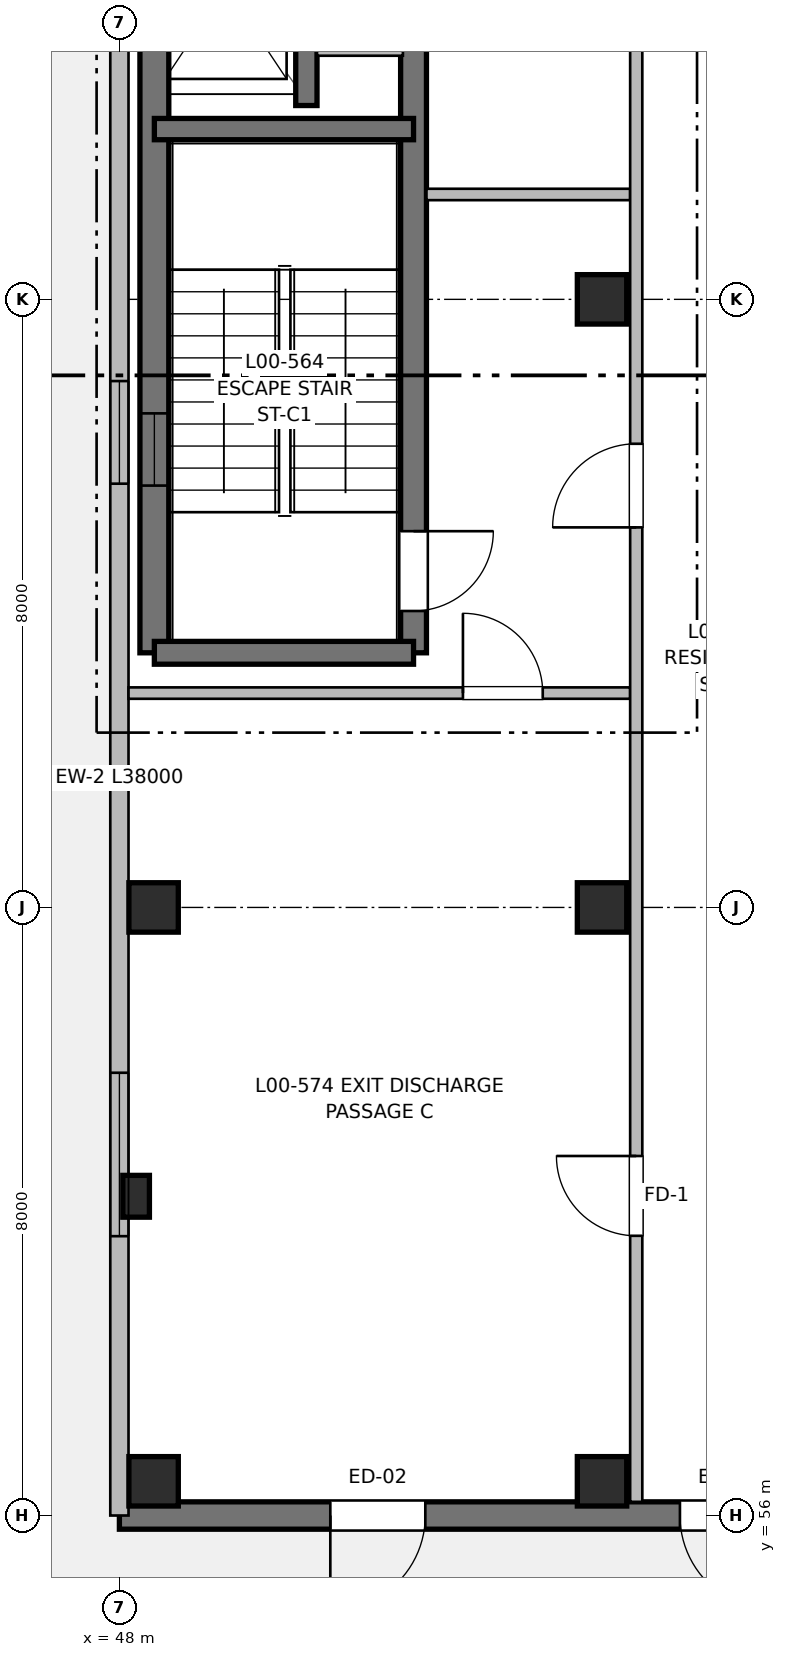
"""IFC4 building model, lengths in metres.
Left out: names, types, materials, properties, quantities, classifications, styles, units other than length and angle.
Written with IfcOpenShell. Run it as: python <this file> out.ifc"""

import sys

from ifc_helpers import new_model, si_unit, direction, frame, frame_2d, origin, origin_2d, place, context, subcontext, project, spatial, rectangle, extrude, element, fill, save


model = new_model("IFC4")
c1 = context("Model", 3, precision=1e-05, world=origin(), true_north=direction((0.0, 1.0)))
c2 = subcontext(c1, "Body", "Model", "MODEL_VIEW")
j1 = project(units=[si_unit("LENGTHUNIT", "METRE"), si_unit("PLANEANGLEUNIT", "RADIAN")], contexts=[c1])
p1 = place(None, origin())
s1 = spatial("IfcSite", under=j1, at=p1, CompositionType="ELEMENT")
p2 = place(p1, origin())
s2 = spatial("IfcBuilding", under=s1, at=p2, CompositionType="ELEMENT")
p3 = place(p2, origin())
s3 = spatial("IfcBuildingStorey", under=s2, at=p3, CompositionType="ELEMENT", Elevation=0.0)
p4 = place(p3, frame((48.22, 60.2, 0.0), z_axis=(0.0, 0.0, 1.0), x_axis=(1.0, 0.0, 0.0)))
e1 = element("IfcColumn", 1, at=p4, inside=s3, PredefinedType="PILASTER", context=c2, shape_type="SweptSolid", body=[
    extrude(rectangle(XDim=0.35, YDim=0.55, at=origin_2d()), origin(), (0.0, 0.0, 1.0), 4.16),
])
for number, where, z_axis, x_axis in (
    (2, (48.45, 56.45, 0.0), (0.0, 0.0, 1.0), (1.0, 0.0, 0.0)),
    (3, (48.45, 64.0, 0.0), (0.0, 0.0, 1.0), (1.0, 0.0, 0.0)),
    (4, (54.35, 56.45, 0.0), (0.0, 0.0, 1.0), (1.0, 0.0, 0.0)),
    (5, (54.35, 64.0, 0.0), (0.0, 0.0, 1.0), (1.0, 0.0, 0.0)),
    (6, (54.35, 72.0, 0.0), (0.0, 0.0, 1.0), (1.0, 0.0, 0.0)),
):
    element("IfcColumn", number, at=place(p3, frame(where, z_axis=z_axis, x_axis=x_axis)), inside=s3, PredefinedType="COLUMN", context=c2, shape_type="SweptSolid", body=[
        extrude(rectangle(XDim=0.65, YDim=0.65, at=origin_2d()), origin(), (0.0, 0.0, 1.0), 4.16),
    ])
p5 = place(p3, frame((48.46, 67.35, 0.0), z_axis=(0.0, 0.0, 1.0), x_axis=(0.0, 1.0, 0.0)))
e7 = element("IfcWall", 7, at=p5, inside=s3, PredefinedType="SHEAR", context=c2, shape_type="SweptSolid", body=[
    extrude(rectangle(XDim=12.45, YDim=0.38, at=frame_2d((6.225, 0.0))), origin(), (0.0, 0.0, 1.0), 4.16),
])
p6 = place(p5, frame((2.2, 0.0, 1.2)))
e8 = element("IfcOpeningElement", 8, at=p6, cuts=e7, PredefinedType="OPENING", context=c2, shape_type="SweptSolid", body=[
    extrude(rectangle(XDim=0.95, YDim=1.25, at=frame_2d((0.475, 0.625))), frame((0.0, 0.2, 0.0), z_axis=(0.0, -1.0, 0.0), x_axis=(1.0, 0.0, 0.0)), (0.0, 0.0, 1.0), 0.4),
])
p7 = place(p3, frame((51.87, 79.8, 0.0), z_axis=(0.0, 0.0, 1.0), x_axis=(0.0, -1.0, 0.0)))
e9 = element("IfcWall", 9, at=p7, inside=s3, PredefinedType="SHEAR", context=c2, shape_type="SweptSolid", body=[
    extrude(rectangle(XDim=12.45, YDim=0.34, at=frame_2d((6.225, 0.0))), origin(), (0.0, 0.0, 1.0), 4.16),
])
p8 = place(p7, frame((10.85, 0.0, 0.0)))
e10 = element("IfcOpeningElement", 10, at=p8, cuts=e9, PredefinedType="OPENING", context=c2, shape_type="SweptSolid", body=[
    extrude(rectangle(XDim=1.05, YDim=2.15, at=frame_2d((0.525, 1.075))), frame((0.0, 0.18, 0.0), z_axis=(0.0, -1.0, 0.0), x_axis=(1.0, 0.0, 0.0)), (0.0, 0.0, 1.0), 0.36),
])
p9 = place(p3, frame((51.87, 67.35, 0.0), z_axis=(0.0, 0.0, 1.0), x_axis=(-1.0, 0.0, 0.0)))
e11 = element("IfcWall", 11, at=p9, inside=s3, PredefinedType="SHEAR", context=c2, shape_type="SweptSolid", body=[
    extrude(rectangle(XDim=3.41, YDim=0.3, at=frame_2d((1.705, 0.0))), origin(), (0.0, 0.0, 1.0), 4.16),
])
p10 = place(p3, frame((48.46, 74.24, 0.0), z_axis=(0.0, 0.0, 1.0), x_axis=(1.0, 0.0, 0.0)))
e12 = element("IfcWall", 12, at=p10, inside=s3, PredefinedType="SHEAR", context=c2, shape_type="SweptSolid", body=[
    extrude(rectangle(XDim=3.41, YDim=0.28, at=frame_2d((1.705, 0.0))), origin(), (0.0, 0.0, 1.0), 4.16),
])
p11 = place(p3, frame((50.46, 74.55, 0.0), z_axis=(0.0, 0.0, 1.0), x_axis=(0.0, 1.0, 0.0)))
e13 = element("IfcWall", 13, at=p11, inside=s3, PredefinedType="SHEAR", context=c2, shape_type="SweptSolid", body=[
    extrude(rectangle(XDim=5.25, YDim=0.28, at=frame_2d((2.625, 0.0))), origin(), (0.0, 0.0, 1.0), 4.16),
])
p12 = place(p11, frame((1.15, 0.0, 0.0)))
e14 = element("IfcOpeningElement", 14, at=p12, cuts=e13, PredefinedType="OPENING", context=c2, shape_type="SweptSolid", body=[
    extrude(rectangle(XDim=1.0, YDim=2.15, at=frame_2d((0.5, 1.075))), frame((0.0, 0.15, 0.0), z_axis=(0.0, -1.0, 0.0), x_axis=(1.0, 0.0, 0.0)), (0.0, 0.0, 1.0), 0.3),
])
p13 = place(p11, frame((3.85, 0.0, 0.0)))
e15 = element("IfcOpeningElement", 15, at=p13, cuts=e13, PredefinedType="OPENING", context=c2, shape_type="SweptSolid", body=[
    extrude(rectangle(XDim=0.9, YDim=2.15, at=frame_2d((0.45, 1.075))), frame((0.0, 0.15, 0.0), z_axis=(0.0, -1.0, 0.0), x_axis=(1.0, 0.0, 0.0)), (0.0, 0.0, 1.0), 0.3),
])
p14 = place(p3, frame((50.6, 75.28, 0.0), z_axis=(0.0, 0.0, 1.0), x_axis=(1.0, 0.0, 0.0)))
e16 = element("IfcWall", 16, at=p14, inside=s3, PredefinedType="PARTITIONING", context=c2, shape_type="SweptSolid", body=[
    extrude(rectangle(XDim=1.13, YDim=0.15, at=frame_2d((0.565, 0.0))), origin(), (0.0, 0.0, 1.0), 3.91),
])
p15 = place(p3, frame((64.0, 56.0, 0.0), z_axis=(0.0, 0.0, 1.0), x_axis=(-1.0, 0.0, 0.0)))
e17 = element("IfcWall", 17, at=p15, inside=s3, PredefinedType="SHEAR", context=c2, shape_type="SweptSolid", body=[
    extrude(rectangle(XDim=16.0, YDim=0.36, at=frame_2d((8.0, 0.0))), origin(), (0.0, 0.0, 1.0), 3.94),
])
p16 = place(p15, frame((7.375, 0.0, 0.0)))
e18 = element("IfcOpeningElement", 18, at=p16, cuts=e17, PredefinedType="OPENING", context=c2, shape_type="SweptSolid", body=[
    extrude(rectangle(XDim=1.25, YDim=2.2, at=frame_2d((0.625, 1.1))), frame((0.0, 0.19, 0.0), z_axis=(0.0, -1.0, 0.0), x_axis=(1.0, 0.0, 0.0)), (0.0, 0.0, 1.0), 0.38),
])
p17 = place(p15, frame((11.975, 0.0, 0.0)))
e19 = element("IfcOpeningElement", 19, at=p17, cuts=e17, PredefinedType="OPENING", context=c2, shape_type="SweptSolid", body=[
    extrude(rectangle(XDim=1.25, YDim=2.2, at=frame_2d((0.625, 1.1))), frame((0.0, 0.19, 0.0), z_axis=(0.0, -1.0, 0.0), x_axis=(1.0, 0.0, 0.0)), (0.0, 0.0, 1.0), 0.38),
])
p18 = place(p3, frame((48.0, 56.0, 0.0), z_axis=(0.0, 0.0, 1.0), x_axis=(0.0, 1.0, 0.0)))
e20 = element("IfcWall", 20, at=p18, inside=s3, PredefinedType="SOLIDWALL", context=c2, shape_type="SweptSolid", body=[
    extrude(rectangle(XDim=38.0, YDim=0.24, at=frame_2d((19.0, 0.0))), origin(), (0.0, 0.0, 1.0), 3.94),
])
p19 = place(p18, frame((3.675, 0.0, 0.95)))
e21 = element("IfcOpeningElement", 21, at=p19, cuts=e20, PredefinedType="OPENING", context=c2, shape_type="SweptSolid", body=[
    extrude(rectangle(XDim=2.15, YDim=1.8, at=frame_2d((1.075, 0.9))), frame((0.0, 0.13, 0.0), z_axis=(0.0, -1.0, 0.0), x_axis=(1.0, 0.0, 0.0)), (0.0, 0.0, 1.0), 0.26),
])
p20 = place(p18, frame((13.575, 0.0, 0.95)))
e22 = element("IfcOpeningElement", 22, at=p20, cuts=e20, PredefinedType="OPENING", context=c2, shape_type="SweptSolid", body=[
    extrude(rectangle(XDim=1.35, YDim=1.3, at=frame_2d((0.675, 0.65))), frame((0.0, 0.13, 0.0), z_axis=(0.0, -1.0, 0.0), x_axis=(1.0, 0.0, 0.0)), (0.0, 0.0, 1.0), 0.26),
])
p21 = place(p18, frame((23.975, 0.0, 0.95)))
e23 = element("IfcOpeningElement", 23, at=p21, cuts=e20, PredefinedType="OPENING", context=c2, shape_type="SweptSolid", body=[
    extrude(rectangle(XDim=2.15, YDim=1.8, at=frame_2d((1.075, 0.9))), frame((0.0, 0.13, 0.0), z_axis=(0.0, -1.0, 0.0), x_axis=(1.0, 0.0, 0.0)), (0.0, 0.0, 1.0), 0.26),
])
p22 = place(p18, frame((32.575, 0.0, 0.95)))
e24 = element("IfcOpeningElement", 24, at=p22, cuts=e20, PredefinedType="OPENING", context=c2, shape_type="SweptSolid", body=[
    extrude(rectangle(XDim=1.35, YDim=1.3, at=frame_2d((0.675, 0.65))), frame((0.0, 0.13, 0.0), z_axis=(0.0, -1.0, 0.0), x_axis=(1.0, 0.0, 0.0)), (0.0, 0.0, 1.0), 0.26),
])
p23 = place(p3, frame((48.12, 66.82, 0.0), z_axis=(0.0, 0.0, 1.0), x_axis=(1.0, 0.0, 0.0)))
e25 = element("IfcWall", 25, at=p23, inside=s3, PredefinedType="PARTITIONING", context=c2, shape_type="SweptSolid", body=[
    extrude(rectangle(XDim=6.6, YDim=0.15, at=frame_2d((3.3, 0.0))), origin(), (0.0, 0.0, 1.0), 3.895),
])
p24 = place(p23, frame((4.4, 0.0, 0.0)))
e26 = element("IfcOpeningElement", 26, at=p24, cuts=e25, PredefinedType="OPENING", context=c2, shape_type="SweptSolid", body=[
    extrude(rectangle(XDim=1.05, YDim=2.15, at=frame_2d((0.525, 1.075))), frame((0.0, 0.085, 0.0), z_axis=(0.0, -1.0, 0.0), x_axis=(1.0, 0.0, 0.0)), (0.0, 0.0, 1.0), 0.17),
])
p25 = place(p3, frame((52.04, 73.38, 0.0), z_axis=(0.0, 0.0, 1.0), x_axis=(1.0, 0.0, 0.0)))
e27 = element("IfcWall", 27, at=p25, inside=s3, PredefinedType="PARTITIONING", context=c2, shape_type="SweptSolid", body=[
    extrude(rectangle(XDim=2.68, YDim=0.15, at=frame_2d((1.34, 0.0))), origin(), (0.0, 0.0, 1.0), 3.895),
])
p26 = place(p3, frame((54.8, 56.18, 0.0), z_axis=(0.0, 0.0, 1.0), x_axis=(0.0, 1.0, 0.0)))
e28 = element("IfcWall", 28, at=p26, inside=s3, PredefinedType="PARTITIONING", context=c2, shape_type="SweptSolid", body=[
    extrude(rectangle(XDim=50.62, YDim=0.16, at=frame_2d((25.31, 0.0))), origin(), (0.0, 0.0, 1.0), 3.895),
])
p27 = place(p26, frame((12.82, 0.0, 0.0)))
e29 = element("IfcOpeningElement", 29, at=p27, cuts=e28, PredefinedType="OPENING", context=c2, shape_type="SweptSolid", body=[
    extrude(rectangle(XDim=1.1, YDim=2.15, at=frame_2d((0.55, 1.075))), frame((0.0, 0.09, 0.0), z_axis=(0.0, -1.0, 0.0), x_axis=(1.0, 0.0, 0.0)), (0.0, 0.0, 1.0), 0.18),
])
p28 = place(p26, frame((19.22, 0.0, 0.0)))
e30 = element("IfcOpeningElement", 30, at=p28, cuts=e28, PredefinedType="OPENING", context=c2, shape_type="SweptSolid", body=[
    extrude(rectangle(XDim=1.6, YDim=2.15, at=frame_2d((0.8, 1.075))), frame((0.0, 0.09, 0.0), z_axis=(0.0, -1.0, 0.0), x_axis=(1.0, 0.0, 0.0)), (0.0, 0.0, 1.0), 0.18),
])
p29 = place(p26, frame((3.5, 0.0, 0.0)))
e31 = element("IfcOpeningElement", 31, at=p29, cuts=e28, PredefinedType="OPENING", context=c2, shape_type="SweptSolid", body=[
    extrude(rectangle(XDim=1.05, YDim=2.15, at=frame_2d((0.525, 1.075))), frame((0.0, 0.09, 0.0), z_axis=(0.0, -1.0, 0.0), x_axis=(1.0, 0.0, 0.0)), (0.0, 0.0, 1.0), 0.18),
])
p30 = place(p26, frame((29.2, 0.0, 0.0)))
e32 = element("IfcOpeningElement", 32, at=p30, cuts=e28, PredefinedType="OPENING", context=c2, shape_type="SweptSolid", body=[
    extrude(rectangle(XDim=1.55, YDim=2.2, at=frame_2d((0.775, 1.1))), frame((0.0, 0.09, 0.0), z_axis=(0.0, -1.0, 0.0), x_axis=(1.0, 0.0, 0.0)), (0.0, 0.0, 1.0), 0.18),
])
p31 = place(p8, origin())
e33 = element("IfcDoor", 33, at=p31, inside=s3, OperationType="SINGLE_SWING_LEFT", PredefinedType="DOOR", context=c2, shape_type="SweptSolid", body=[
    extrude(rectangle(XDim=1.05, YDim=2.15, at=frame_2d((0.525, 1.075))), frame((0.0, 0.025, 0.0), z_axis=(0.0, -1.0, 0.0), x_axis=(1.0, 0.0, 0.0)), (0.0, 0.0, 1.0), 0.05),
])
fill(e10, e33)
p32 = place(p6, origin())
e34 = element("IfcWindow", 34, at=p32, inside=s3, PartitioningType="SINGLE_PANEL", PredefinedType="WINDOW", context=c2, shape_type="SweptSolid", body=[
    extrude(rectangle(XDim=0.95, YDim=1.25, at=frame_2d((0.475, 0.625))), frame((0.0, 0.03, 0.0), z_axis=(0.0, -1.0, 0.0), x_axis=(1.0, 0.0, 0.0)), (0.0, 0.0, 1.0), 0.06),
])
fill(e8, e34)
p33 = place(p16, origin())
e35 = element("IfcDoor", 35, at=p33, inside=s3, OperationType="SINGLE_SWING_LEFT", PredefinedType="DOOR", context=c2, shape_type="SweptSolid", body=[
    extrude(rectangle(XDim=1.25, YDim=2.2, at=frame_2d((0.625, 1.1))), frame((0.0, 0.025, 0.0), z_axis=(0.0, -1.0, 0.0), x_axis=(1.0, 0.0, 0.0)), (0.0, 0.0, 1.0), 0.05),
])
fill(e18, e35)
p34 = place(p17, origin())
e36 = element("IfcDoor", 36, at=p34, inside=s3, OperationType="SINGLE_SWING_RIGHT", PredefinedType="DOOR", context=c2, shape_type="SweptSolid", body=[
    extrude(rectangle(XDim=1.25, YDim=2.2, at=frame_2d((0.625, 1.1))), frame((0.0, 0.025, 0.0), z_axis=(0.0, -1.0, 0.0), x_axis=(1.0, 0.0, 0.0)), (0.0, 0.0, 1.0), 0.05),
])
fill(e19, e36)
p35 = place(p19, origin())
e37 = element("IfcWindow", 37, at=p35, inside=s3, PartitioningType="SINGLE_PANEL", PredefinedType="WINDOW", context=c2, shape_type="SweptSolid", body=[
    extrude(rectangle(XDim=2.15, YDim=1.8, at=frame_2d((1.075, 0.9))), frame((0.0, 0.03, 0.0), z_axis=(0.0, -1.0, 0.0), x_axis=(1.0, 0.0, 0.0)), (0.0, 0.0, 1.0), 0.06),
])
fill(e21, e37)
p36 = place(p20, origin())
e38 = element("IfcWindow", 38, at=p36, inside=s3, PartitioningType="SINGLE_PANEL", PredefinedType="WINDOW", context=c2, shape_type="SweptSolid", body=[
    extrude(rectangle(XDim=1.35, YDim=1.3, at=frame_2d((0.675, 0.65))), frame((0.0, 0.03, 0.0), z_axis=(0.0, -1.0, 0.0), x_axis=(1.0, 0.0, 0.0)), (0.0, 0.0, 1.0), 0.06),
])
fill(e22, e38)
p37 = place(p27, origin())
e39 = element("IfcDoor", 39, at=p37, inside=s3, OperationType="SINGLE_SWING_LEFT", PredefinedType="DOOR", context=c2, shape_type="SweptSolid", body=[
    extrude(rectangle(XDim=1.1, YDim=2.15, at=frame_2d((0.55, 1.075))), frame((0.0, 0.025, 0.0), z_axis=(0.0, -1.0, 0.0), x_axis=(1.0, 0.0, 0.0)), (0.0, 0.0, 1.0), 0.05),
])
fill(e29, e39)
p38 = place(p24, origin())
e40 = element("IfcDoor", 40, at=p38, inside=s3, OperationType="SINGLE_SWING_LEFT", PredefinedType="DOOR", context=c2, shape_type="SweptSolid", body=[
    extrude(rectangle(XDim=1.05, YDim=2.15, at=frame_2d((0.525, 1.075))), frame((0.0, 0.025, 0.0), z_axis=(0.0, -1.0, 0.0), x_axis=(1.0, 0.0, 0.0)), (0.0, 0.0, 1.0), 0.05),
])
fill(e26, e40)
p39 = place(p29, origin())
e41 = element("IfcDoor", 41, at=p39, inside=s3, OperationType="SINGLE_SWING_RIGHT", PredefinedType="DOOR", context=c2, shape_type="SweptSolid", body=[
    extrude(rectangle(XDim=1.05, YDim=2.15, at=frame_2d((0.525, 1.075))), frame((0.0, 0.025, 0.0), z_axis=(0.0, -1.0, 0.0), x_axis=(1.0, 0.0, 0.0)), (0.0, 0.0, 1.0), 0.05),
])
fill(e31, e41)
save(model, sys.argv[1])
